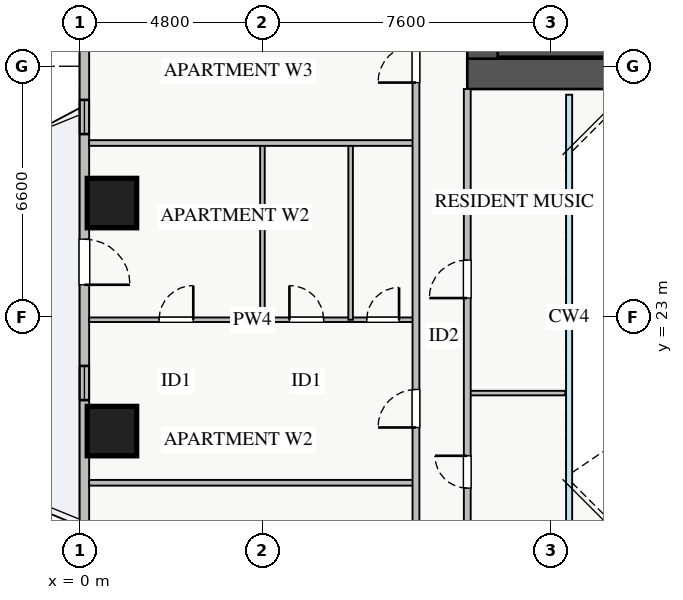
"""IFC4 building model, lengths in metres.
Left out: names, types, materials, properties, quantities, classifications, styles, units other than length and angle.
Written with IfcOpenShell. Run it as: python <this file> out.ifc"""

import sys

from ifc_helpers import new_model, si_unit, direction, frame, frame_2d, origin, origin_2d, place, context, subcontext, project, spatial, rectangle, extrude, source, transform, mapped, element, fill, save


model = new_model("IFC4")
c1 = context("Model", 3, precision=1e-05, world=origin(), true_north=direction((0.0, 1.0)))
c2 = subcontext(c1, "Body", "Model", "MODEL_VIEW")
j1 = project(units=[si_unit("LENGTHUNIT", "METRE"), si_unit("PLANEANGLEUNIT", "RADIAN")], contexts=[c1])
p1 = place(None, origin())
s1 = spatial("IfcSite", under=j1, at=p1, CompositionType="ELEMENT")
p2 = place(p1, origin())
s2 = spatial("IfcBuilding", under=s1, at=p2, CompositionType="ELEMENT")
p3 = place(p2, frame((0.0, 0.0, 82.75)))
s3 = spatial("IfcBuildingStorey", under=s2, at=p3, CompositionType="ELEMENT", Elevation=82.75)
p4 = place(p3, frame((11.0, 29.95, 0.0), z_axis=(0.0, 0.0, 1.0), x_axis=(1.0, 0.0, 0.0)))
e1 = element("IfcWall", 1, at=p4, inside=s3, PredefinedType="SHEAR", context=c2, shape_type="SweptSolid", body=[
    extrude(rectangle(XDim=7.15, YDim=0.2, at=frame_2d((3.575, 0.0))), origin(), (0.0, 0.0, 1.0), 3.25),
])
p5 = place(p3, frame((10.2, 29.4, 0.0), z_axis=(0.0, 0.0, 1.0), x_axis=(1.0, 0.0, 0.0)))
e2 = element("IfcWall", 2, at=p5, inside=s3, PredefinedType="SHEAR", context=c2, shape_type="SweptSolid", body=[
    extrude(rectangle(XDim=17.6, YDim=0.8, at=frame_2d((8.8, 0.0))), origin(), (0.0, 0.0, 1.0), 3.25),
])
p6 = place(p3, frame((10.6, 29.8, 0.0), z_axis=(0.0, 0.0, 1.0), x_axis=(0.0, 1.0, 0.0)))
e3 = element("IfcWall", 3, at=p6, inside=s3, PredefinedType="SHEAR", context=c2, shape_type="SweptSolid", body=[
    extrude(rectangle(XDim=5.6, YDim=0.8, at=frame_2d((2.8, 0.0))), origin(), (0.0, 0.0, 1.0), 3.25),
])
m1 = source(origin(), c2, "Body", "SweptSolid", [
    extrude(rectangle(XDim=1.3, YDim=1.3, at=origin_2d()), origin(), (0.0, 0.0, 1.0), 3.25),
])
for number, where, z_axis, x_axis in (
    (4, (0.85, 26.0, 0.0), (0.0, 0.0, 1.0), (1.0, 0.0, 0.0)),
    (5, (0.85, 20.0, 0.0), (0.0, 0.0, 1.0), (1.0, 0.0, 0.0)),
):
    element("IfcColumn", number, at=place(p3, frame(where, z_axis=z_axis, x_axis=x_axis)), inside=s3, PredefinedType="COLUMN", context=c2, shape_type="MappedRepresentation", body=[
        mapped(m1, transform((0.0, 0.0, 0.0), x_axis=(1.0, 0.0, 0.0), y_axis=(0.0, 1.0, 0.0), z_axis=(0.0, 0.0, 1.0), scale=1.0)),
    ])
p7 = place(p3, frame((0.125, 9.45, 0.0), z_axis=(0.0, 0.0, 1.0), x_axis=(0.0, 1.0, 0.0)))
e6 = element("IfcWall", 6, at=p7, inside=s3, PredefinedType="STANDARD", context=c2, shape_type="SweptSolid", body=[
    extrude(rectangle(XDim=27.1, YDim=0.25, at=frame_2d((13.55, 0.0))), origin(), (0.0, 0.0, 1.0), 2.61),
])
p8 = place(p7, frame((14.4, 0.0, 0.0)))
e7 = element("IfcOpeningElement", 7, at=p8, cuts=e6, PredefinedType="OPENING", context=c2, shape_type="SweptSolid", body=[
    extrude(rectangle(XDim=1.2, YDim=2.1, at=frame_2d((0.6, 1.05))), frame((0.0, 0.135, 0.0), z_axis=(0.0, -1.0, 0.0), x_axis=(1.0, 0.0, 0.0)), (0.0, 0.0, 1.0), 0.27),
])
p9 = place(p7, frame((2.188, 0.0, 0.9)))
e8 = element("IfcOpeningElement", 8, at=p9, cuts=e6, PredefinedType="OPENING", context=c2, shape_type="SweptSolid", body=[
    extrude(rectangle(XDim=2.4, YDim=1.48, at=frame_2d((1.2, 0.74))), frame((0.0, 0.135, 0.0), z_axis=(0.0, -1.0, 0.0), x_axis=(1.0, 0.0, 0.0)), (0.0, 0.0, 1.0), 0.27),
])
p10 = place(p7, frame((23.272, 0.0, 0.9)))
e9 = element("IfcOpeningElement", 9, at=p10, cuts=e6, PredefinedType="OPENING", context=c2, shape_type="SweptSolid", body=[
    extrude(rectangle(XDim=2.1, YDim=1.5, at=frame_2d((1.05, 0.75))), frame((0.0, 0.135, 0.0), z_axis=(0.0, -1.0, 0.0), x_axis=(1.0, 0.0, 0.0)), (0.0, 0.0, 1.0), 0.27),
])
p11 = place(p7, frame((11.365, 0.0, 0.9)))
e10 = element("IfcOpeningElement", 10, at=p11, cuts=e6, PredefinedType="OPENING", context=c2, shape_type="SweptSolid", body=[
    extrude(rectangle(XDim=0.9, YDim=1.2, at=frame_2d((0.45, 0.6))), frame((0.0, 0.135, 0.0), z_axis=(0.0, -1.0, 0.0), x_axis=(1.0, 0.0, 0.0)), (0.0, 0.0, 1.0), 0.27),
])
p12 = place(p7, frame((18.365, 0.0, 0.9)))
e11 = element("IfcOpeningElement", 11, at=p12, cuts=e6, PredefinedType="OPENING", context=c2, shape_type="SweptSolid", body=[
    extrude(rectangle(XDim=0.9, YDim=1.2, at=frame_2d((0.45, 0.6))), frame((0.0, 0.135, 0.0), z_axis=(0.0, -1.0, 0.0), x_axis=(1.0, 0.0, 0.0)), (0.0, 0.0, 1.0), 0.27),
])
p13 = place(p3, frame((0.25, 22.93, 0.0), z_axis=(0.0, 0.0, 1.0), x_axis=(1.0, 0.0, 0.0)))
e12 = element("IfcWall", 12, at=p13, inside=s3, PredefinedType="PLUMBINGWALL", context=c2, shape_type="SweptSolid", body=[
    extrude(rectangle(XDim=8.6, YDim=0.12, at=frame_2d((4.3, 0.0))), origin(), (0.0, 0.0, 1.0), 3.07),
])
p14 = place(p13, frame((1.84, 0.0, 0.0)))
e13 = element("IfcOpeningElement", 13, at=p14, cuts=e12, PredefinedType="OPENING", context=c2, shape_type="SweptSolid", body=[
    extrude(rectangle(XDim=0.9, YDim=2.05, at=frame_2d((0.45, 1.025))), frame((0.0, 0.07, 0.0), z_axis=(0.0, -1.0, 0.0), x_axis=(1.0, 0.0, 0.0)), (0.0, 0.0, 1.0), 0.14),
])
p15 = place(p13, frame((5.27, 0.0, 0.0)))
e14 = element("IfcOpeningElement", 14, at=p15, cuts=e12, PredefinedType="OPENING", context=c2, shape_type="SweptSolid", body=[
    extrude(rectangle(XDim=0.9, YDim=2.05, at=frame_2d((0.45, 1.025))), frame((0.0, 0.07, 0.0), z_axis=(0.0, -1.0, 0.0), x_axis=(1.0, 0.0, 0.0)), (0.0, 0.0, 1.0), 0.14),
])
p16 = place(p13, frame((7.305, 0.0, 0.0)))
e15 = element("IfcOpeningElement", 15, at=p16, cuts=e12, PredefinedType="OPENING", context=c2, shape_type="SweptSolid", body=[
    extrude(rectangle(XDim=0.85, YDim=2.05, at=frame_2d((0.425, 1.025))), frame((0.0, 0.07, 0.0), z_axis=(0.0, -1.0, 0.0), x_axis=(1.0, 0.0, 0.0)), (0.0, 0.0, 1.0), 0.14),
])
for number, where, z_axis, x_axis in (
    (16, (4.81, 22.93, 0.0), (0.0, 0.0, 1.0), (0.0, 1.0, 0.0)),
    (17, (7.13, 22.93, 0.0), (0.0, 0.0, 1.0), (0.0, 1.0, 0.0)),
):
    element("IfcWall", number, at=place(p3, frame(where, z_axis=z_axis, x_axis=x_axis)), inside=s3, PredefinedType="PLUMBINGWALL", context=c2, shape_type="SweptSolid", body=[
        extrude(rectangle(XDim=4.65, YDim=0.12, at=frame_2d((2.325, 0.0))), origin(), (0.0, 0.0, 1.0), 3.07),
    ])
p17 = place(p3, frame((0.25, 18.64, 0.0), z_axis=(0.0, 0.0, 1.0), x_axis=(1.0, 0.0, 0.0)))
e18 = element("IfcWall", 18, at=p17, inside=s3, PredefinedType="PARTITIONING", context=c2, shape_type="SweptSolid", body=[
    extrude(rectangle(XDim=8.6, YDim=0.15, at=frame_2d((4.3, 0.0))), origin(), (0.0, 0.0, 1.0), 3.07),
])
p18 = place(p3, frame((0.25, 27.58, 0.0), z_axis=(0.0, 0.0, 1.0), x_axis=(1.0, 0.0, 0.0)))
e19 = element("IfcWall", 19, at=p18, inside=s3, PredefinedType="PARTITIONING", context=c2, shape_type="SweptSolid", body=[
    extrude(rectangle(XDim=8.6, YDim=0.15, at=frame_2d((4.3, 0.0))), origin(), (0.0, 0.0, 1.0), 2.771),
])
p19 = place(p3, frame((8.85, 7.21, 0.0), z_axis=(0.0, 0.0, 1.0), x_axis=(0.0, 1.0, 0.0)))
e20 = element("IfcWall", 20, at=p19, inside=s3, PredefinedType="PARTITIONING", context=c2, shape_type="SweptSolid", body=[
    extrude(rectangle(XDim=31.23, YDim=0.18, at=frame_2d((15.615, 0.0))), origin(), (0.0, 0.0, 1.0), 3.07),
])
p20 = place(p19, frame((30.09, 0.0, 0.0)))
e21 = element("IfcOpeningElement", 21, at=p20, cuts=e20, PredefinedType="OPENING", context=c2, shape_type="SweptSolid", body=[
    extrude(rectangle(XDim=0.9, YDim=2.05, at=frame_2d((0.45, 1.025))), frame((0.0, 0.1, 0.0), z_axis=(0.0, -1.0, 0.0), x_axis=(1.0, 0.0, 0.0)), (0.0, 0.0, 1.0), 0.2),
])
p21 = place(p19, frame((0.24, 0.0, 0.0)))
e22 = element("IfcOpeningElement", 22, at=p21, cuts=e20, PredefinedType="OPENING", context=c2, shape_type="SweptSolid", body=[
    extrude(rectangle(XDim=0.9, YDim=2.05, at=frame_2d((0.45, 1.025))), frame((0.0, 0.1, 0.0), z_axis=(0.0, -1.0, 0.0), x_axis=(1.0, 0.0, 0.0)), (0.0, 0.0, 1.0), 0.2),
])
p22 = place(p19, frame((5.895, 0.0, 0.0)))
e23 = element("IfcOpeningElement", 23, at=p22, cuts=e20, PredefinedType="OPENING", context=c2, shape_type="SweptSolid", body=[
    extrude(rectangle(XDim=1.0, YDim=2.05, at=frame_2d((0.5, 1.025))), frame((0.0, 0.1, 0.0), z_axis=(0.0, -1.0, 0.0), x_axis=(1.0, 0.0, 0.0)), (0.0, 0.0, 1.0), 0.2),
])
p23 = place(p19, frame((12.885, 0.0, 0.0)))
e24 = element("IfcOpeningElement", 24, at=p23, cuts=e20, PredefinedType="OPENING", context=c2, shape_type="SweptSolid", body=[
    extrude(rectangle(XDim=1.0, YDim=2.05, at=frame_2d((0.5, 1.025))), frame((0.0, 0.1, 0.0), z_axis=(0.0, -1.0, 0.0), x_axis=(1.0, 0.0, 0.0)), (0.0, 0.0, 1.0), 0.2),
])
p24 = place(p19, frame((21.96, 0.0, 0.0)))
e25 = element("IfcOpeningElement", 25, at=p24, cuts=e20, PredefinedType="OPENING", context=c2, shape_type="SweptSolid", body=[
    extrude(rectangle(XDim=1.0, YDim=2.05, at=frame_2d((0.5, 1.025))), frame((0.0, 0.1, 0.0), z_axis=(0.0, -1.0, 0.0), x_axis=(1.0, 0.0, 0.0)), (0.0, 0.0, 1.0), 0.2),
])
p25 = place(p3, frame((10.2, 21.0, 0.0), z_axis=(0.0, 0.0, 1.0), x_axis=(1.0, 0.0, 0.0)))
e26 = element("IfcWall", 26, at=p25, inside=s3, PredefinedType="PLUMBINGWALL", context=c2, shape_type="SweptSolid", body=[
    extrude(rectangle(XDim=2.58, YDim=0.12, at=frame_2d((1.29, 0.0))), origin(), (0.0, 0.0, 1.0), 3.07),
])
p26 = place(p3, frame((10.2, 17.0, 0.0), z_axis=(0.0, 0.0, 1.0), x_axis=(0.0, 1.0, 0.0)))
e27 = element("IfcWall", 27, at=p26, inside=s3, PredefinedType="PARTITIONING", context=c2, shape_type="SweptSolid", body=[
    extrude(rectangle(XDim=12.0, YDim=0.18, at=frame_2d((6.0, 0.0))), origin(), (0.0, 0.0, 1.0), 3.07),
])
p27 = place(p26, frame((1.5, 0.0, 0.0)))
e28 = element("IfcOpeningElement", 28, at=p27, cuts=e27, PredefinedType="OPENING", context=c2, shape_type="SweptSolid", body=[
    extrude(rectangle(XDim=0.85, YDim=2.05, at=frame_2d((0.425, 1.025))), frame((0.0, 0.1, 0.0), z_axis=(0.0, -1.0, 0.0), x_axis=(1.0, 0.0, 0.0)), (0.0, 0.0, 1.0), 0.2),
])
p28 = place(p26, frame((6.5, 0.0, 0.0)))
e29 = element("IfcOpeningElement", 29, at=p28, cuts=e27, PredefinedType="OPENING", context=c2, shape_type="SweptSolid", body=[
    extrude(rectangle(XDim=1.0, YDim=2.05, at=frame_2d((0.5, 1.025))), frame((0.0, 0.1, 0.0), z_axis=(0.0, -1.0, 0.0), x_axis=(1.0, 0.0, 0.0)), (0.0, 0.0, 1.0), 0.2),
])
m2 = source(origin(), c2, "Body", "SweptSolid", [
    extrude(rectangle(XDim=1.2, YDim=2.1, at=frame_2d((0.6, 1.05))), frame((0.0, 0.025, 0.0), z_axis=(0.0, -1.0, 0.0), x_axis=(1.0, 0.0, 0.0)), (0.0, 0.0, 1.0), 0.05),
])
p29 = place(p8, frame((1.2, 0.0, 0.0), z_axis=(0.0, 0.0, 1.0), x_axis=(-1.0, 0.0, 0.0)))
e30 = element("IfcDoor", 30, at=p29, inside=s3, OperationType="SINGLE_SWING_LEFT", PredefinedType="DOOR", context=c2, shape_type="MappedRepresentation", body=[
    mapped(m2, transform((0.0, 0.0, 0.0), x_axis=(1.0, 0.0, 0.0), y_axis=(0.0, 1.0, 0.0), z_axis=(0.0, 0.0, 1.0), scale=1.0)),
])
fill(e7, e30)
m3 = source(origin(), c2, "Body", "SweptSolid", [
    extrude(rectangle(XDim=0.9, YDim=2.05, at=frame_2d((0.45, 1.025))), frame((0.0, 0.025, 0.0), z_axis=(0.0, -1.0, 0.0), x_axis=(1.0, 0.0, 0.0)), (0.0, 0.0, 1.0), 0.05),
])
p30 = place(p14, origin())
e31 = element("IfcDoor", 31, at=p30, inside=s3, OperationType="SINGLE_SWING_RIGHT", PredefinedType="DOOR", context=c2, shape_type="MappedRepresentation", body=[
    mapped(m3, transform((0.0, 0.0, 0.0), x_axis=(1.0, 0.0, 0.0), y_axis=(0.0, 1.0, 0.0), z_axis=(0.0, 0.0, 1.0), scale=1.0)),
])
fill(e13, e31)
p31 = place(p15, origin())
e32 = element("IfcDoor", 32, at=p31, inside=s3, OperationType="SINGLE_SWING_LEFT", PredefinedType="DOOR", context=c2, shape_type="MappedRepresentation", body=[
    mapped(m3, transform((0.0, 0.0, 0.0), x_axis=(1.0, 0.0, 0.0), y_axis=(0.0, 1.0, 0.0), z_axis=(0.0, 0.0, 1.0), scale=1.0)),
])
fill(e14, e32)
m4 = source(origin(), c2, "Body", "SweptSolid", [
    extrude(rectangle(XDim=0.85, YDim=2.05, at=frame_2d((0.425, 1.025))), frame((0.0, 0.025, 0.0), z_axis=(0.0, -1.0, 0.0), x_axis=(1.0, 0.0, 0.0)), (0.0, 0.0, 1.0), 0.05),
])
p32 = place(p16, origin())
e33 = element("IfcDoor", 33, at=p32, inside=s3, OperationType="SINGLE_SWING_RIGHT", PredefinedType="DOOR", context=c2, shape_type="MappedRepresentation", body=[
    mapped(m4, transform((0.0, 0.0, 0.0), x_axis=(1.0, 0.0, 0.0), y_axis=(0.0, 1.0, 0.0), z_axis=(0.0, 0.0, 1.0), scale=1.0)),
])
fill(e15, e33)
m5 = source(origin(), c2, "Body", "SweptSolid", [
    extrude(rectangle(XDim=1.0, YDim=2.05, at=frame_2d((0.5, 1.025))), frame((0.0, 0.025, 0.0), z_axis=(0.0, -1.0, 0.0), x_axis=(1.0, 0.0, 0.0)), (0.0, 0.0, 1.0), 0.05),
])
p33 = place(p23, origin())
e34 = element("IfcDoor", 34, at=p33, inside=s3, OperationType="SINGLE_SWING_LEFT", PredefinedType="DOOR", context=c2, shape_type="MappedRepresentation", body=[
    mapped(m5, transform((0.0, 0.0, 0.0), x_axis=(1.0, 0.0, 0.0), y_axis=(0.0, 1.0, 0.0), z_axis=(0.0, 0.0, 1.0), scale=1.0)),
])
fill(e24, e34)
p34 = place(p24, origin())
e35 = element("IfcDoor", 35, at=p34, inside=s3, OperationType="SINGLE_SWING_LEFT", PredefinedType="DOOR", context=c2, shape_type="MappedRepresentation", body=[
    mapped(m5, transform((0.0, 0.0, 0.0), x_axis=(1.0, 0.0, 0.0), y_axis=(0.0, 1.0, 0.0), z_axis=(0.0, 0.0, 1.0), scale=1.0)),
])
fill(e25, e35)
p35 = place(p27, origin())
e36 = element("IfcDoor", 36, at=p35, inside=s3, OperationType="SINGLE_SWING_RIGHT", PredefinedType="DOOR", context=c2, shape_type="MappedRepresentation", body=[
    mapped(m4, transform((0.0, 0.0, 0.0), x_axis=(1.0, 0.0, 0.0), y_axis=(0.0, 1.0, 0.0), z_axis=(0.0, 0.0, 1.0), scale=1.0)),
])
fill(e28, e36)
p36 = place(p28, origin())
e37 = element("IfcDoor", 37, at=p36, inside=s3, OperationType="SINGLE_SWING_LEFT", PredefinedType="DOOR", context=c2, shape_type="MappedRepresentation", body=[
    mapped(m5, transform((0.0, 0.0, 0.0), x_axis=(1.0, 0.0, 0.0), y_axis=(0.0, 1.0, 0.0), z_axis=(0.0, 0.0, 1.0), scale=1.0)),
])
fill(e29, e37)
m6 = source(origin(), c2, "Body", "SweptSolid", [
    extrude(rectangle(XDim=0.9, YDim=1.2, at=frame_2d((0.45, 0.6))), frame((0.0, 0.03, 0.0), z_axis=(0.0, -1.0, 0.0), x_axis=(1.0, 0.0, 0.0)), (0.0, 0.0, 1.0), 0.06),
])
p37 = place(p11, origin())
e38 = element("IfcWindow", 38, at=p37, inside=s3, PartitioningType="SINGLE_PANEL", PredefinedType="WINDOW", context=c2, shape_type="MappedRepresentation", body=[
    mapped(m6, transform((0.0, 0.0, 0.0), x_axis=(1.0, 0.0, 0.0), y_axis=(0.0, 1.0, 0.0), z_axis=(0.0, 0.0, 1.0), scale=1.0)),
])
fill(e10, e38)
p38 = place(p12, origin())
e39 = element("IfcWindow", 39, at=p38, inside=s3, PartitioningType="SINGLE_PANEL", PredefinedType="WINDOW", context=c2, shape_type="MappedRepresentation", body=[
    mapped(m6, transform((0.0, 0.0, 0.0), x_axis=(1.0, 0.0, 0.0), y_axis=(0.0, 1.0, 0.0), z_axis=(0.0, 0.0, 1.0), scale=1.0)),
])
fill(e11, e39)
save(model, sys.argv[1])
